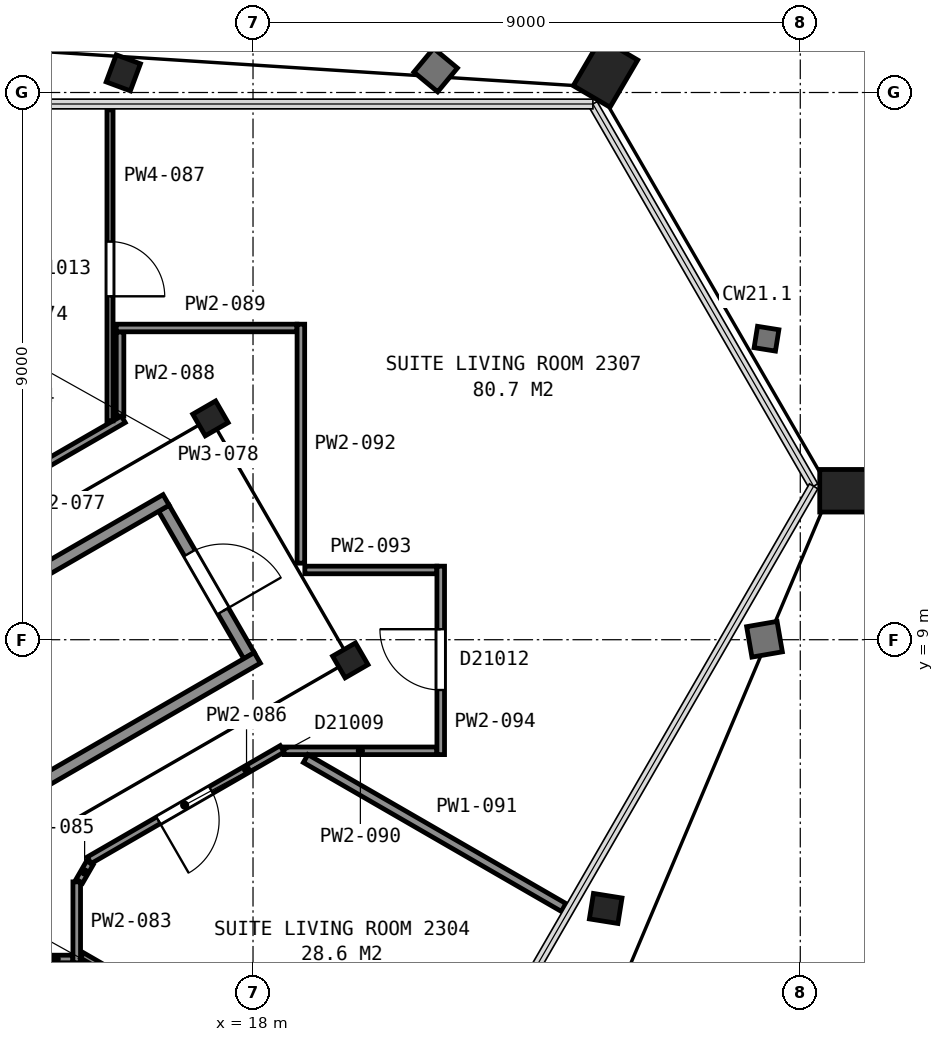
"""IFC4 building model, lengths in metres.
Left out: names, types, materials, properties, quantities, classifications, styles, units other than length and angle.
Written with IfcOpenShell. Run it as: python <this file> out.ifc"""

import sys

from ifc_helpers import new_model, si_unit, direction, frame, frame_2d, origin, origin_2d, place, context, subcontext, project, spatial, rectangle, hollow_rectangle, i_section, extrude, element, fill, save


model = new_model("IFC4")
c1 = context("Model", 3, precision=1e-05, world=origin(), true_north=direction((0.0, 1.0)))
c2 = subcontext(c1, "Body", "Model", "MODEL_VIEW")
j1 = project(units=[si_unit("LENGTHUNIT", "METRE"), si_unit("PLANEANGLEUNIT", "RADIAN")], contexts=[c1])
p1 = place(None, origin())
s1 = spatial("IfcSite", under=j1, at=p1, CompositionType="ELEMENT")
p2 = place(p1, origin())
s2 = spatial("IfcBuilding", under=s1, at=p2, CompositionType="ELEMENT")
p3 = place(p2, frame((0.0, 0.0, 100.0)))
s3 = spatial("IfcBuildingStorey", under=s2, at=p3, CompositionType="ELEMENT", Elevation=100.0)
p4 = place(p3, frame((23.668, 18.104, 0.075), z_axis=(0.111145878735, 0.189707375629, 0.975529448696), x_axis=(0.496818547965, -0.860754575623, 0.110783080574)))
e1 = element("IfcColumn", 1, at=p4, inside=s3, PredefinedType="COLUMN", context=c2, shape_type="SweptSolid", body=[
    extrude(hollow_rectangle(XDim=0.7, YDim=0.9, WallThickness=0.065, at=origin_2d()), origin(), (0.0, 0.0, 1.0), 3.536),
])
p5 = place(p3, frame((15.783, 18.099, 0.045), z_axis=(0.070693557191, 0.19042310781, 0.97915344098), x_axis=(0.997401572089, 0.000160176462, -0.072042198318)))
e2 = element("IfcColumn", 2, at=p5, inside=s3, PredefinedType="COLUMN", context=c2, shape_type="SweptSolid", body=[
    extrude(i_section(OverallWidth=0.424, OverallDepth=0.475, WebThickness=0.048, FlangeThickness=0.077, FilletRadius=0.015, at=origin_2d()), origin(), (0.0, 0.0, 1.0), 3.585),
])
p6 = place(p3, frame((23.559, 4.618, 0.045), z_axis=(0.203832262206, -0.03259955045, 0.978462916106), x_axis=(-0.498534021373, -0.86361257453, 0.075080960618)))
e3 = element("IfcColumn", 3, at=p6, inside=s3, PredefinedType="COLUMN", context=c2, shape_type="SweptSolid", body=[
    extrude(i_section(OverallWidth=0.424, OverallDepth=0.475, WebThickness=0.048, FlangeThickness=0.077, FilletRadius=0.015, at=origin_2d()), origin(), (0.0, 0.0, 1.0), 3.587),
])
p7 = place(p3, frame((27.517, 11.45, 0.075), z_axis=(0.21954669437, 0.0, 0.975601993126), x_axis=(0.496862162048, -0.860596286786, -0.111812446063)))
e4 = element("IfcColumn", 4, at=p7, inside=s3, PredefinedType="COLUMN", context=c2, shape_type="SweptSolid", body=[
    extrude(hollow_rectangle(XDim=0.7, YDim=0.9, WallThickness=0.065, at=origin_2d()), origin(), (0.0, 0.0, 1.0), 3.536),
])
for number, where, z_axis, x_axis in (
    (5, (19.6, 8.66, 0.0), (0.0, 0.0, 1.0), (0.5, -0.866, 0.0)),
    (6, (17.3, 12.64, 0.0), (0.0, 0.0, 1.0), (0.5, -0.866, 0.0)),
):
    element("IfcColumn", number, at=place(p3, frame(where, z_axis=z_axis, x_axis=x_axis)), inside=s3, PredefinedType="COLUMN", context=c2, shape_type="SweptSolid", body=[
        extrude(i_section(OverallWidth=0.411, OverallDepth=0.434, WebThickness=0.036, FlangeThickness=0.057, FilletRadius=0.015, at=origin_2d()), origin(), (0.0, 0.0, 1.0), 3.6),
    ])
p8 = place(p3, frame((17.934, 8.738, 0.0), z_axis=(0.0, 0.0, 1.0), x_axis=(-0.49998411664, 0.866034573852, 0.0)))
e7 = element("IfcWall", 7, at=p8, inside=s3, PredefinedType="PARTITIONING", context=c2, shape_type="SweptSolid", body=[
    extrude(rectangle(XDim=2.8, YDim=0.2, at=frame_2d((1.4, 0.0))), origin(), (0.0, 0.0, 1.0), 3.35),
])
p9 = place(p8, frame((0.85, 0.0, 0.0)))
e8 = element("IfcOpeningElement", 8, at=p9, cuts=e7, PredefinedType="OPENING", context=c2, shape_type="SweptSolid", body=[
    extrude(rectangle(XDim=1.1, YDim=2.1, at=frame_2d((0.55, 1.05))), frame((0.0, 0.11, 0.0), z_axis=(0.0, -1.0, 0.0), x_axis=(1.0, 0.0, 0.0)), (0.0, 0.0, 1.0), 0.22),
])
for number, where, z_axis, x_axis in (
    (9, (6.178, 5.299, 0.0), (0.0, 0.0, 1.0), (0.866, 0.5, 0.0)),
    (10, (7.678, 2.701, 0.0), (0.0, 0.0, 1.0), (0.866, 0.5, 0.0)),
):
    element("IfcWall", number, at=place(p3, frame(where, z_axis=z_axis, x_axis=x_axis)), inside=s3, PredefinedType="PARTITIONING", context=c2, shape_type="SweptSolid", body=[
        extrude(rectangle(XDim=12.0, YDim=0.2, at=frame_2d((6.0, 0.0))), origin(), (0.0, 0.0, 1.0), 3.35),
    ])
p10 = place(p3, frame((12.556, 10.713, 0.0), z_axis=(0.0, 0.0, 1.0), x_axis=(0.86603035395, 0.499991425964, 0.0)))
e11 = element("IfcWall", 11, at=p10, inside=s3, PredefinedType="PARTITIONING", context=c2, shape_type="SweptSolid", body=[
    extrude(rectangle(XDim=3.824, YDim=0.125, at=frame_2d((1.912, 0.0))), origin(), (0.0, 0.0, 1.0), 2.613),
])
p11 = place(p3, frame((14.489, 3.749, 0.0), z_axis=(0.0, 0.0, 1.0), x_axis=(1.0, 0.0, 0.0)))
e12 = element("IfcWall", 12, at=p11, inside=s3, PredefinedType="PARTITIONING", context=c2, shape_type="SweptSolid", body=[
    extrude(rectangle(XDim=0.547, YDim=0.125, at=frame_2d((0.273, 0.0))), origin(), (0.0, 0.0, 1.0), 2.613),
])
p12 = place(p3, frame((15.101, 3.687, 0.0), z_axis=(0.0, 0.0, 1.0), x_axis=(0.0, 1.0, 0.0)))
e13 = element("IfcWall", 13, at=p12, inside=s3, PredefinedType="PARTITIONING", context=c2, shape_type="SweptSolid", body=[
    extrude(rectangle(XDim=1.331, YDim=0.125, at=frame_2d((0.666, 0.0))), origin(), (0.0, 0.0, 1.0), 2.613),
])
p13 = place(p3, frame((20.787, 0.575, 0.0), z_axis=(0.0, 0.0, 1.0), x_axis=(-0.866012632051, 0.500022120638, 0.0)))
e14 = element("IfcWall", 14, at=p13, inside=s3, PredefinedType="PARTITIONING", context=c2, shape_type="SweptSolid", body=[
    extrude(rectangle(XDim=6.465, YDim=0.1, at=frame_2d((3.232, 0.0))), origin(), (0.0, 0.0, 1.0), 2.613),
])
p14 = place(p13, frame((2.866, 0.0, 0.0)))
e15 = element("IfcOpeningElement", 15, at=p14, cuts=e14, PredefinedType="OPENING", context=c2, shape_type="SweptSolid", body=[
    extrude(rectangle(XDim=0.9, YDim=2.1, at=frame_2d((0.45, 1.05))), frame((0.0, 0.06, 0.0), z_axis=(0.0, -1.0, 0.0), x_axis=(1.0, 0.0, 0.0)), (0.0, 0.0, 1.0), 0.12),
])
p15 = place(p3, frame((15.144, 5.029, 0.0), z_axis=(0.0, 0.0, 1.0), x_axis=(0.499682006278, 0.86620891972, 0.0)))
e16 = element("IfcWall", 16, at=p15, inside=s3, PredefinedType="PARTITIONING", context=c2, shape_type="SweptSolid", body=[
    extrude(rectangle(XDim=0.348, YDim=0.125, at=frame_2d((0.174, 0.0))), origin(), (0.0, 0.0, 1.0), 2.613),
])
p16 = place(p3, frame((18.478, 7.204, 0.0), z_axis=(0.0, 0.0, 1.0), x_axis=(-0.866011320536, -0.500024392108, 0.0)))
e17 = element("IfcWall", 17, at=p16, inside=s3, PredefinedType="PARTITIONING", context=c2, shape_type="SweptSolid", body=[
    extrude(rectangle(XDim=3.663, YDim=0.125, at=frame_2d((1.832, 0.0))), origin(), (0.0, 0.0, 1.0), 2.613),
])
p17 = place(p16, frame((1.351, 0.0, 0.0)))
e18 = element("IfcOpeningElement", 18, at=p17, cuts=e17, PredefinedType="OPENING", context=c2, shape_type="SweptSolid", body=[
    extrude(rectangle(XDim=1.0, YDim=2.1, at=frame_2d((0.5, 1.05))), frame((0.0, 0.073, 0.0), z_axis=(0.0, -1.0, 0.0), x_axis=(1.0, 0.0, 0.0)), (0.0, 0.0, 1.0), 0.145),
])
p18 = place(p3, frame((15.648, 12.599, 0.0), z_axis=(0.0, 0.0, 1.0), x_axis=(0.0, 1.0, 0.0)))
e19 = element("IfcWall", 19, at=p18, inside=s3, PredefinedType="PARTITIONING", context=c2, shape_type="SweptSolid", body=[
    extrude(rectangle(XDim=5.116, YDim=0.1, at=frame_2d((2.558, 0.0))), origin(), (0.0, 0.0, 1.0), 2.613),
])
p19 = place(p18, frame((2.049, 0.0, 0.0)))
e20 = element("IfcOpeningElement", 20, at=p19, cuts=e19, PredefinedType="OPENING", context=c2, shape_type="SweptSolid", body=[
    extrude(rectangle(XDim=0.9, YDim=2.1, at=frame_2d((0.45, 1.05))), frame((0.0, 0.06, 0.0), z_axis=(0.0, -1.0, 0.0), x_axis=(1.0, 0.0, 0.0)), (0.0, 0.0, 1.0), 0.12),
])
p20 = place(p3, frame((15.813, 12.679, 0.0), z_axis=(0.0, 0.0, 1.0), x_axis=(0.0, 1.0, 0.0)))
e21 = element("IfcWall", 21, at=p20, inside=s3, PredefinedType="PARTITIONING", context=c2, shape_type="SweptSolid", body=[
    extrude(rectangle(XDim=1.383, YDim=0.125, at=frame_2d((0.691, 0.0))), origin(), (0.0, 0.0, 1.0), 2.613),
])
p21 = place(p3, frame((15.75, 14.127, 0.0), z_axis=(0.0, 0.0, 1.0), x_axis=(1.0, 0.0, 0.0)))
e22 = element("IfcWall", 22, at=p21, inside=s3, PredefinedType="PARTITIONING", context=c2, shape_type="SweptSolid", body=[
    extrude(rectangle(XDim=2.971, YDim=0.125, at=frame_2d((1.486, 0.0))), origin(), (0.0, 0.0, 1.0), 2.613),
])
p22 = place(p3, frame((18.509, 7.173, 0.0), z_axis=(0.0, 0.0, 1.0), x_axis=(1.0, 0.0, 0.0)))
e23 = element("IfcWall", 23, at=p22, inside=s3, PredefinedType="PARTITIONING", context=c2, shape_type="SweptSolid", body=[
    extrude(rectangle(XDim=2.513, YDim=0.125, at=frame_2d((1.256, 0.0))), origin(), (0.0, 0.0, 1.0), 2.613),
])
p23 = place(p3, frame((18.866, 7.046, 0.0), z_axis=(0.0, 0.0, 1.0), x_axis=(0.866042025588, -0.499971209087, 0.0)))
e24 = element("IfcWall", 24, at=p23, inside=s3, PredefinedType="PARTITIONING", context=c2, shape_type="SweptSolid", body=[
    extrude(rectangle(XDim=4.899, YDim=0.15, at=frame_2d((2.45, 0.0))), origin(), (0.0, 0.0, 1.0), 2.613),
])
p24 = place(p3, frame((18.787, 10.259, 0.0), z_axis=(0.0, 0.0, 1.0), x_axis=(0.0, 1.0, 0.0)))
e25 = element("IfcWall", 25, at=p24, inside=s3, PredefinedType="PARTITIONING", context=c2, shape_type="SweptSolid", body=[
    extrude(rectangle(XDim=3.93, YDim=0.125, at=frame_2d((1.965, 0.0))), origin(), (0.0, 0.0, 1.0), 2.613),
])
p25 = place(p3, frame((18.852, 10.147, 0.0), z_axis=(0.0, 0.0, 1.0), x_axis=(1.0, 0.0, 0.0)))
e26 = element("IfcWall", 26, at=p25, inside=s3, PredefinedType="PARTITIONING", context=c2, shape_type="SweptSolid", body=[
    extrude(rectangle(XDim=2.17, YDim=0.125, at=frame_2d((1.085, 0.0))), origin(), (0.0, 0.0, 1.0), 2.613),
])
p26 = place(p3, frame((21.087, 10.209, 0.0), z_axis=(0.0, 0.0, 1.0), x_axis=(0.0, -1.0, 0.0)))
e27 = element("IfcWall", 27, at=p26, inside=s3, PredefinedType="PARTITIONING", context=c2, shape_type="SweptSolid", body=[
    extrude(rectangle(XDim=3.099, YDim=0.125, at=frame_2d((1.549, 0.0))), origin(), (0.0, 0.0, 1.0), 2.613),
])
p27 = place(p26, frame((1.037, 0.0, 0.0)))
e28 = element("IfcOpeningElement", 28, at=p27, cuts=e27, PredefinedType="OPENING", context=c2, shape_type="SweptSolid", body=[
    extrude(rectangle(XDim=1.0, YDim=2.1, at=frame_2d((0.5, 1.05))), frame((0.0, 0.073, 0.0), z_axis=(0.0, -1.0, 0.0), x_axis=(1.0, 0.0, 0.0)), (0.0, 0.0, 1.0), 0.145),
])
p28 = place(p9, origin())
e29 = element("IfcDoor", 29, at=p28, inside=s3, OperationType="SINGLE_SWING_LEFT", PredefinedType="DOOR", context=c2, shape_type="SweptSolid", body=[
    extrude(rectangle(XDim=1.1, YDim=2.1, at=frame_2d((0.55, 1.05))), frame((0.0, 0.025, 0.0), z_axis=(0.0, -1.0, 0.0), x_axis=(1.0, 0.0, 0.0)), (0.0, 0.0, 1.0), 0.05),
])
fill(e8, e29)
p29 = place(p17, origin())
e30 = element("IfcDoor", 30, at=p29, inside=s3, OperationType="SINGLE_SWING_RIGHT", PredefinedType="DOOR", context=c2, shape_type="SweptSolid", body=[
    extrude(rectangle(XDim=1.0, YDim=2.1, at=frame_2d((0.5, 1.05))), frame((0.0, 0.025, 0.0), z_axis=(0.0, -1.0, 0.0), x_axis=(1.0, 0.0, 0.0)), (0.0, 0.0, 1.0), 0.05),
])
fill(e18, e30)
p30 = place(p19, origin())
e31 = element("IfcDoor", 31, at=p30, inside=s3, OperationType="SINGLE_SWING_LEFT", PredefinedType="DOOR", context=c2, shape_type="SweptSolid", body=[
    extrude(rectangle(XDim=0.9, YDim=2.1, at=frame_2d((0.45, 1.05))), frame((0.0, 0.025, 0.0), z_axis=(0.0, -1.0, 0.0), x_axis=(1.0, 0.0, 0.0)), (0.0, 0.0, 1.0), 0.05),
])
fill(e20, e31)
p31 = place(p27, origin())
e32 = element("IfcDoor", 32, at=p31, inside=s3, OperationType="SINGLE_SWING_LEFT", PredefinedType="DOOR", context=c2, shape_type="SweptSolid", body=[
    extrude(rectangle(XDim=1.0, YDim=2.1, at=frame_2d((0.5, 1.05))), frame((0.0, 0.025, 0.0), z_axis=(0.0, -1.0, 0.0), x_axis=(1.0, 0.0, 0.0)), (0.0, 0.0, 1.0), 0.05),
])
fill(e28, e32)
save(model, sys.argv[1])
